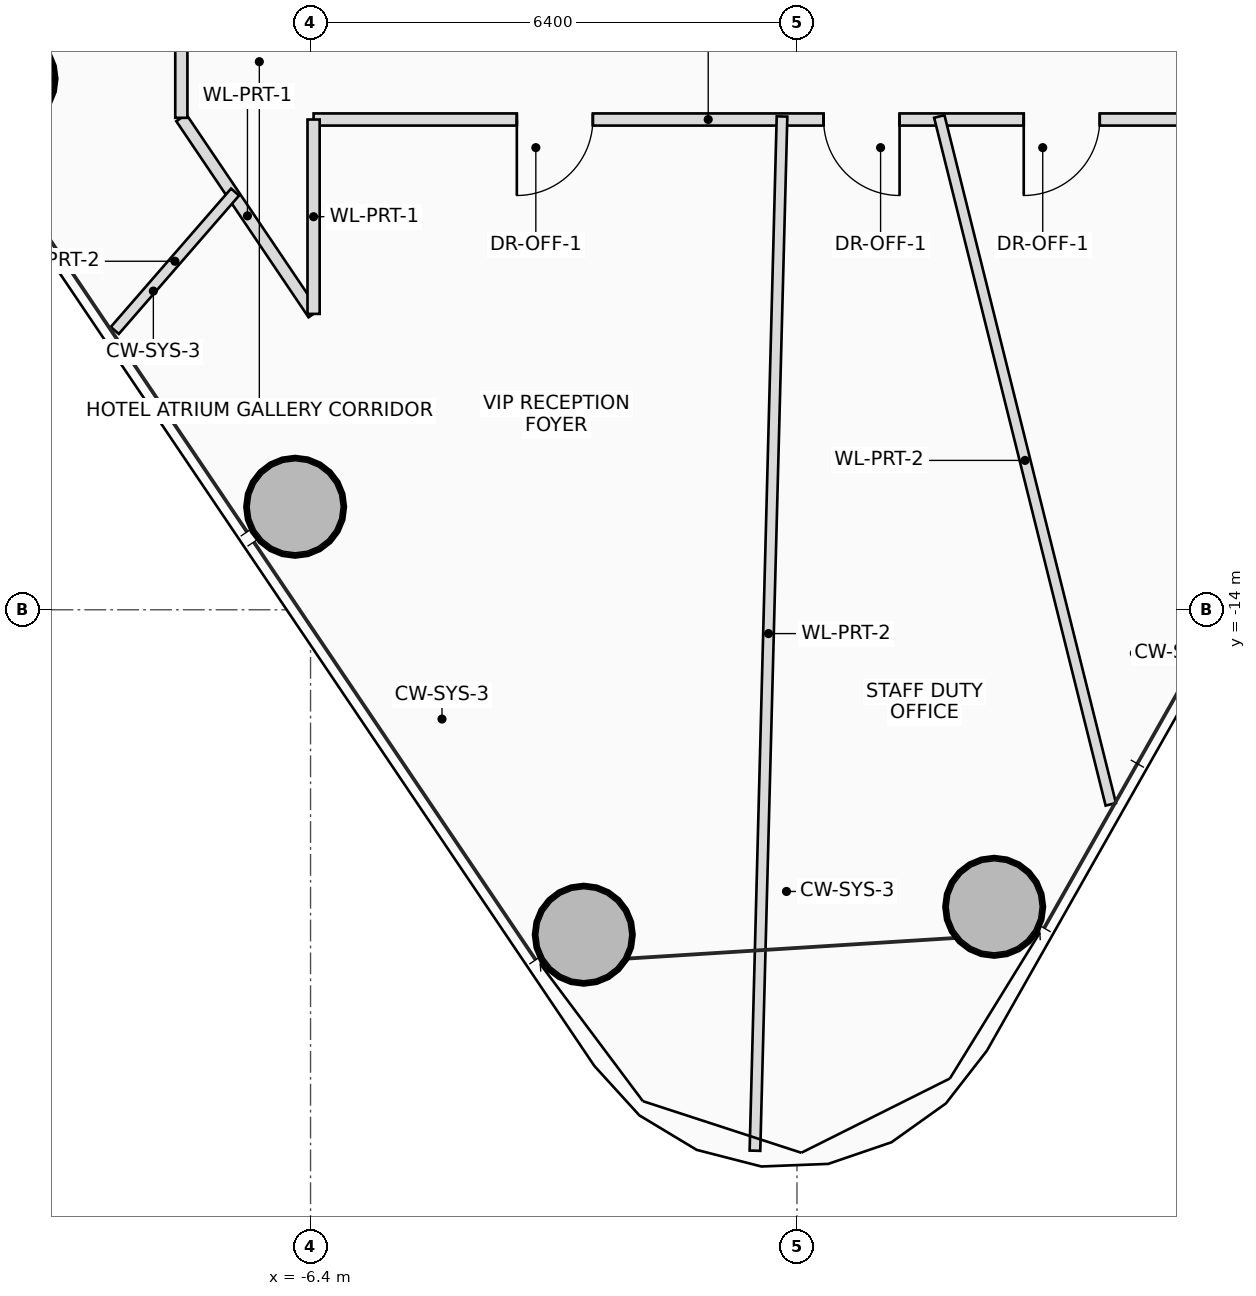
"""IFC4 building model, lengths in metres.
Left out: names, types, materials, properties, quantities, classifications, styles, units other than length and angle.
Written with IfcOpenShell. Run it as: python <this file> out.ifc"""

import sys

from ifc_helpers import new_model, si_unit, direction, frame, frame_2d, origin, origin_2d, place, context, subcontext, project, spatial, rectangle, hollow_circle, extrude, source, transform, mapped, element, fill, save


model = new_model("IFC4")
c1 = context("Model", 3, precision=1e-05, world=origin(), true_north=direction((0.0, 1.0)))
c2 = subcontext(c1, "Body", "Model", "MODEL_VIEW")
j1 = project(units=[si_unit("LENGTHUNIT", "METRE"), si_unit("PLANEANGLEUNIT", "RADIAN")], contexts=[c1])
p1 = place(None, origin())
s1 = spatial("IfcSite", under=j1, at=p1, CompositionType="ELEMENT")
p2 = place(p1, origin())
s2 = spatial("IfcBuilding", under=s1, at=p2, CompositionType="ELEMENT")
p3 = place(p2, frame((0.0, 0.0, 169.1)))
s3 = spatial("IfcBuildingStorey", under=s2, at=p3, CompositionType="ELEMENT", Elevation=169.1)
m1 = source(origin(), c2, "Body", "SweptSolid", [
    extrude(hollow_circle(Radius=0.65, WallThickness=0.045, at=origin_2d()), origin(), (0.0, 0.0, 1.0), 3.45),
])
for number, where, z_axis, x_axis in (
    (1, (2.595, -17.908, 0.0), (0.0, 0.0, 1.0), (1.0, 0.0, 0.0)),
    (2, (-10.4, -7.015, 0.0), (0.0, 0.0, 1.0), (1.0, 0.0, 0.0)),
    (3, (-6.603, -12.645, 0.0), (0.0, 0.0, 1.0), (1.0, 0.0, 0.0)),
    (4, (-2.805, -18.275, 0.0), (0.0, 0.0, 1.0), (1.0, 0.0, 0.0)),
):
    element("IfcColumn", number, at=place(p3, frame(where, z_axis=z_axis, x_axis=x_axis)), inside=s3, PredefinedType="COLUMN", context=c2, shape_type="MappedRepresentation", body=[
        mapped(m1, transform((0.0, 0.0, 0.0), scale=1.0)),
    ])
p4 = place(p3, frame((-6.36, -10.107, 0.0), z_axis=(0.0, 0.0, 1.0), x_axis=(-0.559200615657, 0.829032370567, 0.0)))
e5 = element("IfcWall", 5, at=p4, inside=s3, PredefinedType="PARTITIONING", context=c2, shape_type="SweptSolid", body=[
    extrude(rectangle(XDim=3.112, YDim=0.16, at=frame_2d((1.556, 0.0))), origin(), (0.0, 0.0, 1.0), 2.605),
])
p5 = place(p3, frame((-8.1, -7.528, 0.0), z_axis=(0.0, 0.0, 1.0), x_axis=(0.0, 1.0, 0.0)))
e6 = element("IfcWall", 6, at=p5, inside=s3, PredefinedType="PARTITIONING", context=c2, shape_type="SweptSolid", body=[
    extrude(rectangle(XDim=15.078, YDim=0.16, at=frame_2d((7.539, 0.0))), origin(), (0.0, 0.0, 1.0), 2.605),
])
p6 = place(p5, frame((3.265, 0.0, 0.0)))
e7 = element("IfcOpeningElement", 7, at=p6, cuts=e6, PredefinedType="OPENING", context=c2, shape_type="SweptSolid", body=[
    extrude(rectangle(XDim=0.9, YDim=2.05, at=frame_2d((0.45, 1.025))), frame((0.0, 0.09, 0.0), z_axis=(0.0, -1.0, 0.0), x_axis=(1.0, 0.0, 0.0)), (0.0, 0.0, 1.0), 0.18),
])
p7 = place(p5, frame((9.079, 0.0, 0.0)))
e8 = element("IfcOpeningElement", 8, at=p7, cuts=e6, PredefinedType="OPENING", context=c2, shape_type="SweptSolid", body=[
    extrude(rectangle(XDim=1.05, YDim=2.2, at=frame_2d((0.525, 1.1))), frame((0.0, 0.09, 0.0), z_axis=(0.0, -1.0, 0.0), x_axis=(1.0, 0.0, 0.0)), (0.0, 0.0, 1.0), 0.18),
])
p8 = place(p5, frame((12.91, 0.0, 0.0)))
e9 = element("IfcOpeningElement", 9, at=p8, cuts=e6, PredefinedType="OPENING", context=c2, shape_type="SweptSolid", body=[
    extrude(rectangle(XDim=1.05, YDim=2.2, at=frame_2d((0.525, 1.1))), frame((0.0, 0.09, 0.0), z_axis=(0.0, -1.0, 0.0), x_axis=(1.0, 0.0, 0.0)), (0.0, 0.0, 1.0), 0.18),
])
p9 = place(p3, frame((5.25, -7.55, 0.0), z_axis=(0.0, 0.0, 1.0), x_axis=(-1.0, 0.0, 0.0)))
e10 = element("IfcWall", 10, at=p9, inside=s3, PredefinedType="PARTITIONING", context=c2, shape_type="SweptSolid", body=[
    extrude(rectangle(XDim=11.61, YDim=0.16, at=frame_2d((5.805, 0.0))), origin(), (0.0, 0.0, 1.0), 2.605),
])
p10 = place(p9, frame((1.267, 0.0, 0.0)))
e11 = element("IfcOpeningElement", 11, at=p10, cuts=e10, PredefinedType="OPENING", context=c2, shape_type="SweptSolid", body=[
    extrude(rectangle(XDim=1.0, YDim=2.25, at=frame_2d((0.5, 1.125))), frame((0.0, 0.09, 0.0), z_axis=(0.0, -1.0, 0.0), x_axis=(1.0, 0.0, 0.0)), (0.0, 0.0, 1.0), 0.18),
])
p11 = place(p9, frame((3.9, 0.0, 0.0)))
e12 = element("IfcOpeningElement", 12, at=p11, cuts=e10, PredefinedType="OPENING", context=c2, shape_type="SweptSolid", body=[
    extrude(rectangle(XDim=1.0, YDim=2.25, at=frame_2d((0.5, 1.125))), frame((0.0, 0.09, 0.0), z_axis=(0.0, -1.0, 0.0), x_axis=(1.0, 0.0, 0.0)), (0.0, 0.0, 1.0), 0.18),
])
p12 = place(p9, frame((7.936, 0.0, 0.0)))
e13 = element("IfcOpeningElement", 13, at=p12, cuts=e10, PredefinedType="OPENING", context=c2, shape_type="SweptSolid", body=[
    extrude(rectangle(XDim=1.0, YDim=2.25, at=frame_2d((0.5, 1.125))), frame((0.0, 0.09, 0.0), z_axis=(0.0, -1.0, 0.0), x_axis=(1.0, 0.0, 0.0)), (0.0, 0.0, 1.0), 0.18),
])
p13 = place(p3, frame((-6.36, -7.55, 0.0), z_axis=(0.0, 0.0, 1.0), x_axis=(0.0, -1.0, 0.0)))
e14 = element("IfcWall", 14, at=p13, inside=s3, PredefinedType="PARTITIONING", context=c2, shape_type="SweptSolid", body=[
    extrude(rectangle(XDim=2.557, YDim=0.16, at=frame_2d((1.279, 0.0))), origin(), (0.0, 0.0, 1.0), 2.605),
])
p14 = place(p3, frame((-7.393, -8.505, 0.0), z_axis=(0.0, 0.0, 1.0), x_axis=(-0.656043394523, -0.754723170774, 0.0)))
e15 = element("IfcWall", 15, at=p14, inside=s3, PredefinedType="PARTITIONING", context=c2, shape_type="SweptSolid", body=[
    extrude(rectangle(XDim=2.412, YDim=0.14, at=frame_2d((1.206, 0.0))), origin(), (0.0, 0.0, 1.0), 2.765),
])
p15 = place(p3, frame((-0.197, -7.51, 0.0), z_axis=(0.0, 0.0, 1.0), x_axis=(-0.026169420715, -0.999657522064, 0.0)))
e16 = element("IfcWall", 16, at=p15, inside=s3, PredefinedType="PARTITIONING", context=c2, shape_type="SweptSolid", body=[
    extrude(rectangle(XDim=13.611, YDim=0.14, at=frame_2d((6.806, 0.0))), origin(), (0.0, 0.0, 1.0), 2.765),
])
p16 = place(p3, frame((1.873, -7.51, 0.0), z_axis=(0.0, 0.0, 1.0), x_axis=(0.241919667538, -0.970296281791, 0.0)))
e17 = element("IfcWall", 17, at=p16, inside=s3, PredefinedType="PARTITIONING", context=c2, shape_type="SweptSolid", body=[
    extrude(rectangle(XDim=9.327, YDim=0.14, at=frame_2d((4.664, 0.0))), origin(), (0.0, 0.0, 1.0), 2.605),
])
p17 = place(p10, origin())
e18 = element("IfcDoor", 18, at=p17, inside=s3, OperationType="SINGLE_SWING_RIGHT", PredefinedType="DOOR", context=c2, shape_type="SweptSolid", body=[
    extrude(rectangle(XDim=1.0, YDim=2.25, at=frame_2d((0.5, 1.125))), frame((0.0, 0.025, 0.0), z_axis=(0.0, -1.0, 0.0), x_axis=(1.0, 0.0, 0.0)), (0.0, 0.0, 1.0), 0.05),
])
fill(e11, e18)
p18 = place(p11, origin())
e19 = element("IfcDoor", 19, at=p18, inside=s3, OperationType="SINGLE_SWING_LEFT", PredefinedType="DOOR", context=c2, shape_type="SweptSolid", body=[
    extrude(rectangle(XDim=1.0, YDim=2.25, at=frame_2d((0.5, 1.125))), frame((0.0, 0.025, 0.0), z_axis=(0.0, -1.0, 0.0), x_axis=(1.0, 0.0, 0.0)), (0.0, 0.0, 1.0), 0.05),
])
fill(e12, e19)
p19 = place(p12, origin())
e20 = element("IfcDoor", 20, at=p19, inside=s3, OperationType="SINGLE_SWING_RIGHT", PredefinedType="DOOR", context=c2, shape_type="SweptSolid", body=[
    extrude(rectangle(XDim=1.0, YDim=2.25, at=frame_2d((0.5, 1.125))), frame((0.0, 0.025, 0.0), z_axis=(0.0, -1.0, 0.0), x_axis=(1.0, 0.0, 0.0)), (0.0, 0.0, 1.0), 0.05),
])
fill(e13, e20)
save(model, sys.argv[1])
